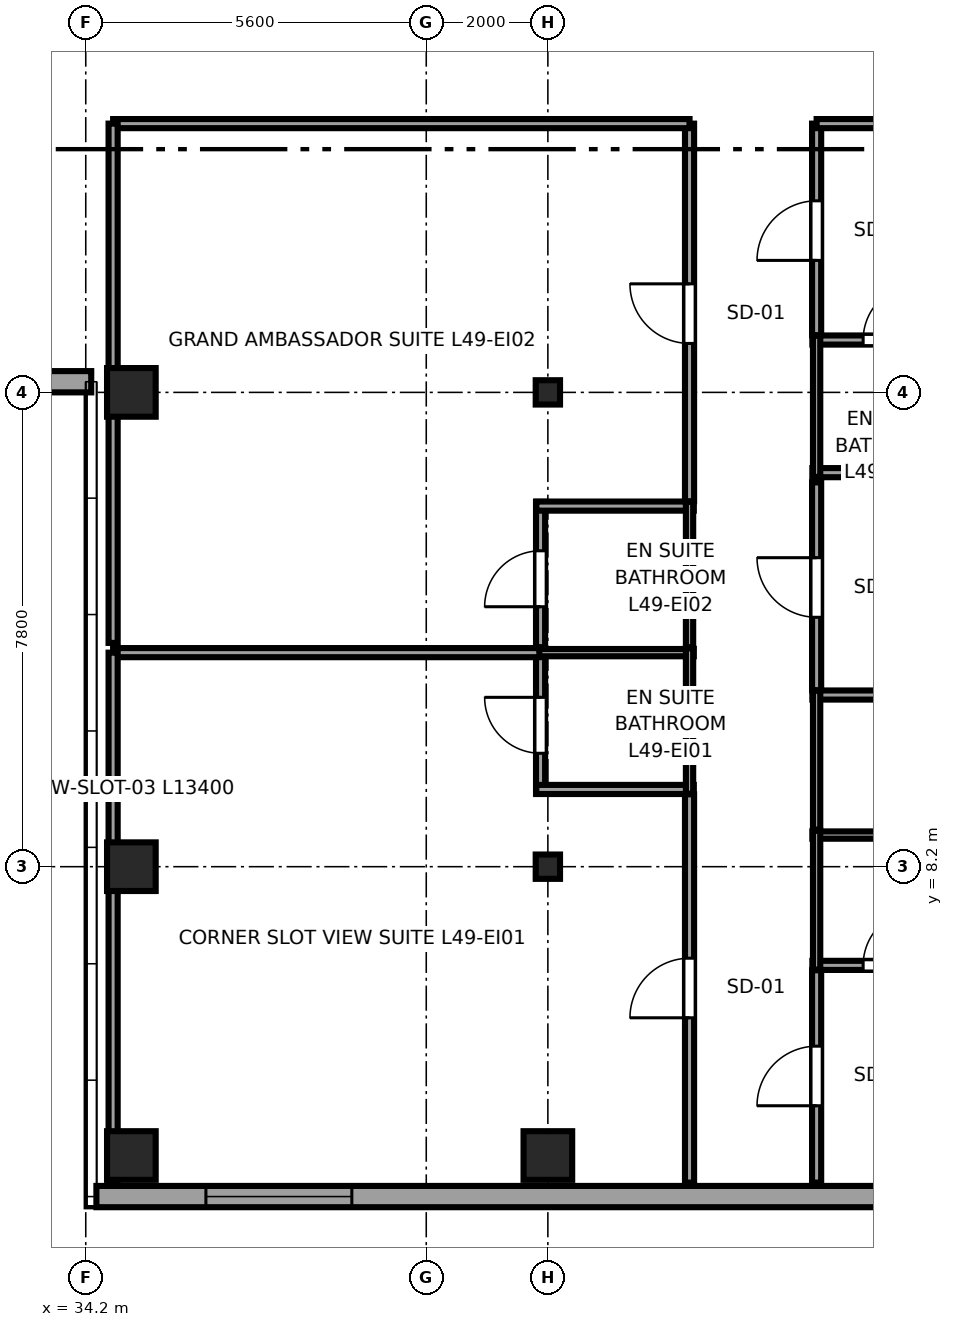
"""IFC4 building model, lengths in metres.
Left out: names, types, materials, properties, quantities, classifications, styles, units other than length and angle.
Written with IfcOpenShell. Run it as: python <this file> out.ifc"""

import sys

from ifc_helpers import new_model, si_unit, direction, frame, frame_2d, origin, origin_2d, place, context, subcontext, project, spatial, rectangle, i_section, extrude, source, transform, mapped, element, fill, save


model = new_model("IFC4")
c1 = context("Model", 3, precision=1e-05, world=origin(), true_north=direction((0.0, 1.0)))
c2 = subcontext(c1, "Body", "Model", "MODEL_VIEW")
j1 = project(units=[si_unit("LENGTHUNIT", "METRE"), si_unit("PLANEANGLEUNIT", "RADIAN")], contexts=[c1])
p1 = place(None, origin())
s1 = spatial("IfcSite", under=j1, at=p1, CompositionType="ELEMENT")
p2 = place(p1, origin())
s2 = spatial("IfcBuilding", under=s1, at=p2, CompositionType="ELEMENT")
p3 = place(p2, frame((0.0, 0.0, 187.55)))
s3 = spatial("IfcBuildingStorey", under=s2, at=p3, CompositionType="ELEMENT", Elevation=187.55)
m1 = source(origin(), c2, "Body", "SweptSolid", [
    extrude(rectangle(XDim=0.8, YDim=0.8, at=origin_2d()), origin(), (0.0, 0.0, 1.0), 3.55),
])
for number, where, z_axis, x_axis in (
    (1, (34.95, 3.45, 0.0), (0.0, 0.0, 1.0), (1.0, 0.0, 0.0)),
    (2, (34.95, 8.2, 0.0), (0.0, 0.0, 1.0), (1.0, 0.0, 0.0)),
    (3, (34.95, 16.0, 0.0), (0.0, 0.0, 1.0), (1.0, 0.0, 0.0)),
    (4, (41.8, 3.45, 0.0), (0.0, 0.0, 1.0), (1.0, 0.0, 0.0)),
):
    element("IfcColumn", number, at=place(p3, frame(where, z_axis=z_axis, x_axis=x_axis)), inside=s3, PredefinedType="COLUMN", context=c2, shape_type="MappedRepresentation", body=[
        mapped(m1, transform((0.0, 0.0, 0.0), x_axis=(1.0, 0.0, 0.0), y_axis=(0.0, 1.0, 0.0), z_axis=(0.0, 0.0, 1.0), scale=1.0)),
    ])
m2 = source(origin(), c2, "Body", "SweptSolid", [
    extrude(i_section(OverallWidth=0.4, OverallDepth=0.4, WebThickness=0.02, FlangeThickness=0.035, at=origin_2d()), origin(), (0.0, 0.0, 1.0), 3.55),
])
for number, where, z_axis, x_axis in (
    (5, (41.8, 8.2, 0.0), (0.0, 0.0, 1.0), (1.0, 0.0, 0.0)),
    (6, (41.8, 16.0, 0.0), (0.0, 0.0, 1.0), (1.0, 0.0, 0.0)),
):
    element("IfcColumn", number, at=place(p3, frame(where, z_axis=z_axis, x_axis=x_axis)), inside=s3, PredefinedType="COLUMN", context=c2, shape_type="MappedRepresentation", body=[
        mapped(m2, transform((0.0, 0.0, 0.0), x_axis=(1.0, 0.0, 0.0), y_axis=(0.0, 1.0, 0.0), z_axis=(0.0, 0.0, 1.0), scale=1.0)),
    ])
p4 = place(p3, frame((22.71, 16.175, 0.0), z_axis=(0.0, 0.0, 1.0), x_axis=(1.0, 0.0, 0.0)))
e7 = element("IfcWall", 7, at=p4, inside=s3, PredefinedType="SOLIDWALL", context=c2, shape_type="SweptSolid", body=[
    extrude(rectangle(XDim=11.58, YDim=0.35, at=frame_2d((5.79, 0.0))), origin(), (0.0, 0.0, 1.0), 2.758),
])
p5 = place(p4, frame((1.995, 0.0, 0.68)))
e8 = element("IfcOpeningElement", 8, at=p5, cuts=e7, PredefinedType="OPENING", context=c2, shape_type="SweptSolid", body=[
    extrude(rectangle(XDim=2.4, YDim=1.9, at=frame_2d((1.2, 0.95))), frame((0.0, 0.185, 0.0), z_axis=(0.0, -1.0, 0.0), x_axis=(1.0, 0.0, 0.0)), (0.0, 0.0, 1.0), 0.37),
])
p6 = place(p4, frame((7.185, 0.0, 0.68)))
e9 = element("IfcOpeningElement", 9, at=p6, cuts=e7, PredefinedType="OPENING", context=c2, shape_type="SweptSolid", body=[
    extrude(rectangle(XDim=2.4, YDim=1.9, at=frame_2d((1.2, 0.95))), frame((0.0, 0.185, 0.0), z_axis=(0.0, -1.0, 0.0), x_axis=(1.0, 0.0, 0.0)), (0.0, 0.0, 1.0), 0.37),
])
p7 = place(p3, frame((34.375, 2.775, 0.0), z_axis=(0.0, 0.0, 1.0), x_axis=(1.0, 0.0, 0.0)))
e10 = element("IfcWall", 10, at=p7, inside=s3, PredefinedType="SOLIDWALL", context=c2, shape_type="SweptSolid", body=[
    extrude(rectangle(XDim=15.608, YDim=0.35, at=frame_2d((7.804, 0.0))), origin(), (0.0, 0.0, 1.0), 3.37),
])
p8 = place(p7, frame((1.801, 0.0, 0.68)))
e11 = element("IfcOpeningElement", 11, at=p8, cuts=e10, PredefinedType="OPENING", context=c2, shape_type="SweptSolid", body=[
    extrude(rectangle(XDim=2.4, YDim=1.9, at=frame_2d((1.2, 0.95))), frame((0.0, 0.185, 0.0), z_axis=(0.0, -1.0, 0.0), x_axis=(1.0, 0.0, 0.0)), (0.0, 0.0, 1.0), 0.37),
])
p9 = place(p7, frame((12.891, 0.0, 0.62)))
e12 = element("IfcOpeningElement", 12, at=p9, cuts=e10, PredefinedType="OPENING", context=c2, shape_type="SweptSolid", body=[
    extrude(rectangle(XDim=1.5, YDim=1.55, at=frame_2d((0.75, 0.775))), frame((0.0, 0.185, 0.0), z_axis=(0.0, -1.0, 0.0), x_axis=(1.0, 0.0, 0.0)), (0.0, 0.0, 1.0), 0.37),
])
p10 = place(p3, frame((41.68, 9.4, 0.0), z_axis=(0.0, 0.0, 1.0), x_axis=(0.0, 1.0, 0.0)))
e13 = element("IfcWall", 13, at=p10, inside=s3, PredefinedType="PARTITIONING", context=c2, shape_type="SweptSolid", body=[
    extrude(rectangle(XDim=2.39, YDim=0.15, at=frame_2d((1.195, 0.0))), origin(), (0.0, 0.0, 1.0), 2.827),
])
p11 = place(p10, frame((0.665, 0.0, 0.0)))
e14 = element("IfcOpeningElement", 14, at=p11, cuts=e13, PredefinedType="OPENING", context=c2, shape_type="SweptSolid", body=[
    extrude(rectangle(XDim=0.92, YDim=2.01, at=frame_2d((0.46, 1.005))), frame((0.0, 0.085, 0.0), z_axis=(0.0, -1.0, 0.0), x_axis=(1.0, 0.0, 0.0)), (0.0, 0.0, 1.0), 0.17),
])
p12 = place(p3, frame((41.61, 9.47, 0.0), z_axis=(0.0, 0.0, 1.0), x_axis=(1.0, 0.0, 0.0)))
e15 = element("IfcWall", 15, at=p12, inside=s3, PredefinedType="PARTITIONING", context=c2, shape_type="SweptSolid", body=[
    extrude(rectangle(XDim=2.59, YDim=0.15, at=frame_2d((1.295, 0.0))), origin(), (0.0, 0.0, 1.0), 3.37),
])
p13 = place(p3, frame((41.61, 11.72, 0.0), z_axis=(0.0, 0.0, 1.0), x_axis=(1.0, 0.0, 0.0)))
e16 = element("IfcWall", 16, at=p13, inside=s3, PredefinedType="PLUMBINGWALL", context=c2, shape_type="SweptSolid", body=[
    extrude(rectangle(XDim=2.59, YDim=0.12, at=frame_2d((1.295, 0.0))), origin(), (0.0, 0.0, 1.0), 3.37),
])
p14 = place(p3, frame((44.13, 9.4, 0.0), z_axis=(0.0, 0.0, 1.0), x_axis=(0.0, 1.0, 0.0)))
e17 = element("IfcWall", 17, at=p14, inside=s3, PredefinedType="PLUMBINGWALL", context=c2, shape_type="SweptSolid", body=[
    extrude(rectangle(XDim=2.39, YDim=0.12, at=frame_2d((1.195, 0.0))), origin(), (0.0, 0.0, 1.0), 3.37),
])
p15 = place(p3, frame((41.68, 11.81, 0.0), z_axis=(0.0, 0.0, 1.0), x_axis=(0.0, 1.0, 0.0)))
e18 = element("IfcWall", 18, at=p15, inside=s3, PredefinedType="PARTITIONING", context=c2, shape_type="SweptSolid", body=[
    extrude(rectangle(XDim=2.39, YDim=0.15, at=frame_2d((1.195, 0.0))), origin(), (0.0, 0.0, 1.0), 2.827),
])
p16 = place(p15, frame((0.665, 0.0, 0.0)))
e19 = element("IfcOpeningElement", 19, at=p16, cuts=e18, PredefinedType="OPENING", context=c2, shape_type="SweptSolid", body=[
    extrude(rectangle(XDim=0.92, YDim=2.01, at=frame_2d((0.46, 1.005))), frame((0.0, 0.085, 0.0), z_axis=(0.0, -1.0, 0.0), x_axis=(1.0, 0.0, 0.0)), (0.0, 0.0, 1.0), 0.17),
])
p17 = place(p3, frame((41.61, 14.13, 0.0), z_axis=(0.0, 0.0, 1.0), x_axis=(1.0, 0.0, 0.0)))
e20 = element("IfcWall", 20, at=p17, inside=s3, PredefinedType="PARTITIONING", context=c2, shape_type="SweptSolid", body=[
    extrude(rectangle(XDim=2.59, YDim=0.15, at=frame_2d((1.295, 0.0))), origin(), (0.0, 0.0, 1.0), 3.37),
])
p18 = place(p3, frame((44.13, 11.81, 0.0), z_axis=(0.0, 0.0, 1.0), x_axis=(0.0, 1.0, 0.0)))
e21 = element("IfcWall", 21, at=p18, inside=s3, PredefinedType="PLUMBINGWALL", context=c2, shape_type="SweptSolid", body=[
    extrude(rectangle(XDim=2.39, YDim=0.12, at=frame_2d((1.195, 0.0))), origin(), (0.0, 0.0, 1.0), 3.37),
])
p19 = place(p3, frame((46.15, 6.577, 0.0), z_axis=(0.0, 0.0, 1.0), x_axis=(1.0, 0.0, 0.0)))
e22 = element("IfcWall", 22, at=p19, inside=s3, PredefinedType="PARTITIONING", context=c2, shape_type="SweptSolid", body=[
    extrude(rectangle(XDim=2.59, YDim=0.15, at=frame_2d((1.295, 0.0))), origin(), (0.0, 0.0, 1.0), 3.37),
])
p20 = place(p19, frame((0.835, 0.0, 0.0)))
e23 = element("IfcOpeningElement", 23, at=p20, cuts=e22, PredefinedType="OPENING", context=c2, shape_type="SweptSolid", body=[
    extrude(rectangle(XDim=0.92, YDim=2.01, at=frame_2d((0.46, 1.005))), frame((0.0, 0.085, 0.0), z_axis=(0.0, -1.0, 0.0), x_axis=(1.0, 0.0, 0.0)), (0.0, 0.0, 1.0), 0.17),
])
p21 = place(p3, frame((46.15, 8.72, 0.0), z_axis=(0.0, 0.0, 1.0), x_axis=(1.0, 0.0, 0.0)))
e24 = element("IfcWall", 24, at=p21, inside=s3, PredefinedType="PLUMBINGWALL", context=c2, shape_type="SweptSolid", body=[
    extrude(rectangle(XDim=2.59, YDim=0.12, at=frame_2d((1.295, 0.0))), origin(), (0.0, 0.0, 1.0), 3.37),
])
p22 = place(p3, frame((46.22, 6.507, 0.0), z_axis=(0.0, 0.0, 1.0), x_axis=(0.0, 1.0, 0.0)))
e25 = element("IfcWall", 25, at=p22, inside=s3, PredefinedType="PLUMBINGWALL", context=c2, shape_type="SweptSolid", body=[
    extrude(rectangle(XDim=2.283, YDim=0.12, at=frame_2d((1.142, 0.0))), origin(), (0.0, 0.0, 1.0), 3.37),
])
p23 = place(p3, frame((46.15, 11.023, 0.0), z_axis=(0.0, 0.0, 1.0), x_axis=(1.0, 0.0, 0.0)))
e26 = element("IfcWall", 26, at=p23, inside=s3, PredefinedType="PARTITIONING", context=c2, shape_type="SweptSolid", body=[
    extrude(rectangle(XDim=2.59, YDim=0.15, at=frame_2d((1.295, 0.0))), origin(), (0.0, 0.0, 1.0), 3.37),
])
p24 = place(p3, frame((46.22, 8.81, 0.0), z_axis=(0.0, 0.0, 1.0), x_axis=(0.0, 1.0, 0.0)))
e27 = element("IfcWall", 27, at=p24, inside=s3, PredefinedType="PLUMBINGWALL", context=c2, shape_type="SweptSolid", body=[
    extrude(rectangle(XDim=2.283, YDim=0.12, at=frame_2d((1.142, 0.0))), origin(), (0.0, 0.0, 1.0), 3.37),
])
p25 = place(p3, frame((46.15, 14.68, 0.0), z_axis=(0.0, 0.0, 1.0), x_axis=(1.0, 0.0, 0.0)))
e28 = element("IfcWall", 28, at=p25, inside=s3, PredefinedType="PARTITIONING", context=c2, shape_type="SweptSolid", body=[
    extrude(rectangle(XDim=7.845, YDim=0.15, at=frame_2d((3.923, 0.0))), origin(), (0.0, 0.0, 1.0), 3.37),
])
p26 = place(p3, frame((46.15, 16.861, 0.0), z_axis=(0.0, 0.0, 1.0), x_axis=(1.0, 0.0, 0.0)))
e29 = element("IfcWall", 29, at=p26, inside=s3, PredefinedType="PARTITIONING", context=c2, shape_type="SweptSolid", body=[
    extrude(rectangle(XDim=2.59, YDim=0.15, at=frame_2d((1.295, 0.0))), origin(), (0.0, 0.0, 1.0), 3.37),
])
p27 = place(p26, frame((0.835, 0.0, 0.0)))
e30 = element("IfcOpeningElement", 30, at=p27, cuts=e29, PredefinedType="OPENING", context=c2, shape_type="SweptSolid", body=[
    extrude(rectangle(XDim=0.92, YDim=2.01, at=frame_2d((0.46, 1.005))), frame((0.0, 0.085, 0.0), z_axis=(0.0, -1.0, 0.0), x_axis=(1.0, 0.0, 0.0)), (0.0, 0.0, 1.0), 0.17),
])
p28 = place(p3, frame((46.22, 14.61, 0.0), z_axis=(0.0, 0.0, 1.0), x_axis=(0.0, 1.0, 0.0)))
e31 = element("IfcWall", 31, at=p28, inside=s3, PredefinedType="PLUMBINGWALL", context=c2, shape_type="SweptSolid", body=[
    extrude(rectangle(XDim=2.321, YDim=0.12, at=frame_2d((1.16, 0.0))), origin(), (0.0, 0.0, 1.0), 3.37),
])
p29 = place(p3, frame((44.13, 3.005, 0.0), z_axis=(0.0, 0.0, 1.0), x_axis=(0.0, 1.0, 0.0)))
e32 = element("IfcWall", 32, at=p29, inside=s3, PredefinedType="PARTITIONING", context=c2, shape_type="SweptSolid", body=[
    extrude(rectangle(XDim=6.385, YDim=0.15, at=frame_2d((3.192, 0.0))), origin(), (0.0, 0.0, 1.0), 3.37),
])
p30 = place(p29, frame((2.71, 0.0, 0.0)))
e33 = element("IfcOpeningElement", 33, at=p30, cuts=e32, PredefinedType="OPENING", context=c2, shape_type="SweptSolid", body=[
    extrude(rectangle(XDim=0.98, YDim=2.12, at=frame_2d((0.49, 1.06))), frame((0.0, 0.085, 0.0), z_axis=(0.0, -1.0, 0.0), x_axis=(1.0, 0.0, 0.0)), (0.0, 0.0, 1.0), 0.17),
])
p31 = place(p3, frame((34.65, 11.72, 0.0), z_axis=(0.0, 0.0, 1.0), x_axis=(1.0, 0.0, 0.0)))
e34 = element("IfcWall", 34, at=p31, inside=s3, PredefinedType="PARTITIONING", context=c2, shape_type="SweptSolid", body=[
    extrude(rectangle(XDim=7.01, YDim=0.15, at=frame_2d((3.505, 0.0))), origin(), (0.0, 0.0, 1.0), 3.37),
])
p32 = place(p3, frame((34.65, 3.005, 0.0), z_axis=(0.0, 0.0, 1.0), x_axis=(0.0, 1.0, 0.0)))
e35 = element("IfcWall", 35, at=p32, inside=s3, PredefinedType="PARTITIONING", context=c2, shape_type="SweptSolid", body=[
    extrude(rectangle(XDim=8.715, YDim=0.15, at=frame_2d((4.357, 0.0))), origin(), (0.0, 0.0, 1.0), 3.37),
])
p33 = place(p3, frame((44.13, 14.21, 0.0), z_axis=(0.0, 0.0, 1.0), x_axis=(0.0, 1.0, 0.0)))
e36 = element("IfcWall", 36, at=p33, inside=s3, PredefinedType="PARTITIONING", context=c2, shape_type="SweptSolid", body=[
    extrude(rectangle(XDim=6.21, YDim=0.15, at=frame_2d((3.105, 0.0))), origin(), (0.0, 0.0, 1.0), 3.37),
])
p34 = place(p33, frame((2.595, 0.0, 0.0)))
e37 = element("IfcOpeningElement", 37, at=p34, cuts=e36, PredefinedType="OPENING", context=c2, shape_type="SweptSolid", body=[
    extrude(rectangle(XDim=0.98, YDim=2.12, at=frame_2d((0.49, 1.06))), frame((0.0, 0.085, 0.0), z_axis=(0.0, -1.0, 0.0), x_axis=(1.0, 0.0, 0.0)), (0.0, 0.0, 1.0), 0.17),
])
p35 = place(p3, frame((34.65, 20.42, 0.0), z_axis=(0.0, 0.0, 1.0), x_axis=(1.0, 0.0, 0.0)))
e38 = element("IfcWall", 38, at=p35, inside=s3, PredefinedType="PARTITIONING", context=c2, shape_type="SweptSolid", body=[
    extrude(rectangle(XDim=9.48, YDim=0.15, at=frame_2d((4.74, 0.0))), origin(), (0.0, 0.0, 1.0), 3.37),
])
p36 = place(p3, frame((34.65, 11.88, 0.0), z_axis=(0.0, 0.0, 1.0), x_axis=(0.0, 1.0, 0.0)))
e39 = element("IfcWall", 39, at=p36, inside=s3, PredefinedType="PARTITIONING", context=c2, shape_type="SweptSolid", body=[
    extrude(rectangle(XDim=8.54, YDim=0.15, at=frame_2d((4.27, 0.0))), origin(), (0.0, 0.0, 1.0), 3.37),
])
p37 = place(p3, frame((46.22, 3.005, 0.0), z_axis=(0.0, 0.0, 1.0), x_axis=(0.0, 1.0, 0.0)))
e40 = element("IfcWall", 40, at=p37, inside=s3, PredefinedType="PARTITIONING", context=c2, shape_type="SweptSolid", body=[
    extrude(rectangle(XDim=3.492, YDim=0.15, at=frame_2d((1.746, 0.0))), origin(), (0.0, 0.0, 1.0), 3.37),
])
p38 = place(p37, frame((1.263, 0.0, 0.0)))
e41 = element("IfcOpeningElement", 41, at=p38, cuts=e40, PredefinedType="OPENING", context=c2, shape_type="SweptSolid", body=[
    extrude(rectangle(XDim=0.98, YDim=2.12, at=frame_2d((0.49, 1.06))), frame((0.0, 0.085, 0.0), z_axis=(0.0, -1.0, 0.0), x_axis=(1.0, 0.0, 0.0)), (0.0, 0.0, 1.0), 0.17),
])
p39 = place(p3, frame((46.22, 11.103, 0.0), z_axis=(0.0, 0.0, 1.0), x_axis=(0.0, 1.0, 0.0)))
e42 = element("IfcWall", 42, at=p39, inside=s3, PredefinedType="PARTITIONING", context=c2, shape_type="SweptSolid", body=[
    extrude(rectangle(XDim=3.417, YDim=0.15, at=frame_2d((1.708, 0.0))), origin(), (0.0, 0.0, 1.0), 3.37),
])
p40 = place(p39, frame((1.198, 0.0, 0.0)))
e43 = element("IfcOpeningElement", 43, at=p40, cuts=e42, PredefinedType="OPENING", context=c2, shape_type="SweptSolid", body=[
    extrude(rectangle(XDim=0.98, YDim=2.12, at=frame_2d((0.49, 1.06))), frame((0.0, 0.085, 0.0), z_axis=(0.0, -1.0, 0.0), x_axis=(1.0, 0.0, 0.0)), (0.0, 0.0, 1.0), 0.17),
])
p41 = place(p3, frame((46.22, 16.941, 0.0), z_axis=(0.0, 0.0, 1.0), x_axis=(0.0, 1.0, 0.0)))
e44 = element("IfcWall", 44, at=p41, inside=s3, PredefinedType="PARTITIONING", context=c2, shape_type="SweptSolid", body=[
    extrude(rectangle(XDim=3.479, YDim=0.15, at=frame_2d((1.74, 0.0))), origin(), (0.0, 0.0, 1.0), 3.37),
])
p42 = place(p41, frame((1.229, 0.0, 0.0)))
e45 = element("IfcOpeningElement", 45, at=p42, cuts=e44, PredefinedType="OPENING", context=c2, shape_type="SweptSolid", body=[
    extrude(rectangle(XDim=0.98, YDim=2.12, at=frame_2d((0.49, 1.06))), frame((0.0, 0.085, 0.0), z_axis=(0.0, -1.0, 0.0), x_axis=(1.0, 0.0, 0.0)), (0.0, 0.0, 1.0), 0.17),
])
p43 = place(p3, frame((46.22, 20.42, 0.0), z_axis=(0.0, 0.0, 1.0), x_axis=(1.0, 0.0, 0.0)))
e46 = element("IfcWall", 46, at=p43, inside=s3, PredefinedType="PARTITIONING", context=c2, shape_type="SweptSolid", body=[
    extrude(rectangle(XDim=7.775, YDim=0.15, at=frame_2d((3.888, 0.0))), origin(), (0.0, 0.0, 1.0), 3.37),
])
m3 = source(origin(), c2, "Body", "SweptSolid", [
    extrude(rectangle(XDim=2.4, YDim=1.9, at=frame_2d((1.2, 0.95))), frame((0.0, 0.09, 0.0), z_axis=(0.0, -1.0, 0.0), x_axis=(1.0, 0.0, 0.0)), (0.0, 0.0, 1.0), 0.06),
])
p44 = place(p8, origin())
e47 = element("IfcWindow", 47, at=p44, inside=s3, PartitioningType="TRIPLE_PANEL_HORIZONTAL", PredefinedType="WINDOW", context=c2, shape_type="MappedRepresentation", body=[
    mapped(m3, transform((0.0, 0.0, 0.0), x_axis=(1.0, 0.0, 0.0), y_axis=(0.0, 1.0, 0.0), z_axis=(0.0, 0.0, 1.0), scale=1.0)),
])
fill(e11, e47)
m4 = source(origin(), c2, "Body", "SweptSolid", [
    extrude(rectangle(XDim=0.92, YDim=2.01, at=frame_2d((0.46, 1.005))), frame((0.0, 0.025, 0.0), z_axis=(0.0, -1.0, 0.0), x_axis=(1.0, 0.0, 0.0)), (0.0, 0.0, 1.0), 0.05),
])
p45 = place(p11, origin())
e48 = element("IfcDoor", 48, at=p45, inside=s3, OperationType="SINGLE_SWING_RIGHT", PredefinedType="DOOR", context=c2, shape_type="MappedRepresentation", body=[
    mapped(m4, transform((0.0, 0.0, 0.0), x_axis=(1.0, 0.0, 0.0), y_axis=(0.0, 1.0, 0.0), z_axis=(0.0, 0.0, 1.0), scale=1.0)),
])
fill(e14, e48)
p46 = place(p16, origin())
e49 = element("IfcDoor", 49, at=p46, inside=s3, OperationType="SINGLE_SWING_LEFT", PredefinedType="DOOR", context=c2, shape_type="MappedRepresentation", body=[
    mapped(m4, transform((0.0, 0.0, 0.0), x_axis=(1.0, 0.0, 0.0), y_axis=(0.0, 1.0, 0.0), z_axis=(0.0, 0.0, 1.0), scale=1.0)),
])
fill(e19, e49)
p47 = place(p20, origin())
e50 = element("IfcDoor", 50, at=p47, inside=s3, OperationType="SINGLE_SWING_RIGHT", PredefinedType="DOOR", context=c2, shape_type="MappedRepresentation", body=[
    mapped(m4, transform((0.0, 0.0, 0.0), x_axis=(1.0, 0.0, 0.0), y_axis=(0.0, 1.0, 0.0), z_axis=(0.0, 0.0, 1.0), scale=1.0)),
])
fill(e23, e50)
p48 = place(p27, origin())
e51 = element("IfcDoor", 51, at=p48, inside=s3, OperationType="SINGLE_SWING_RIGHT", PredefinedType="DOOR", context=c2, shape_type="MappedRepresentation", body=[
    mapped(m4, transform((0.0, 0.0, 0.0), x_axis=(1.0, 0.0, 0.0), y_axis=(0.0, 1.0, 0.0), z_axis=(0.0, 0.0, 1.0), scale=1.0)),
])
fill(e30, e51)
m5 = source(origin(), c2, "Body", "SweptSolid", [
    extrude(rectangle(XDim=0.98, YDim=2.12, at=frame_2d((0.49, 1.06))), frame((0.0, 0.025, 0.0), z_axis=(0.0, -1.0, 0.0), x_axis=(1.0, 0.0, 0.0)), (0.0, 0.0, 1.0), 0.05),
])
p49 = place(p30, origin())
e52 = element("IfcDoor", 52, at=p49, inside=s3, OperationType="SINGLE_SWING_LEFT", PredefinedType="DOOR", context=c2, shape_type="MappedRepresentation", body=[
    mapped(m5, transform((0.0, 0.0, 0.0), x_axis=(1.0, 0.0, 0.0), y_axis=(0.0, 1.0, 0.0), z_axis=(0.0, 0.0, 1.0), scale=1.0)),
])
fill(e33, e52)
p50 = place(p34, origin())
e53 = element("IfcDoor", 53, at=p50, inside=s3, OperationType="SINGLE_SWING_RIGHT", PredefinedType="DOOR", context=c2, shape_type="MappedRepresentation", body=[
    mapped(m5, transform((0.0, 0.0, 0.0), x_axis=(1.0, 0.0, 0.0), y_axis=(0.0, 1.0, 0.0), z_axis=(0.0, 0.0, 1.0), scale=1.0)),
])
fill(e37, e53)
p51 = place(p38, origin())
e54 = element("IfcDoor", 54, at=p51, inside=s3, OperationType="SINGLE_SWING_LEFT", PredefinedType="DOOR", context=c2, shape_type="MappedRepresentation", body=[
    mapped(m5, transform((0.0, 0.0, 0.0), x_axis=(1.0, 0.0, 0.0), y_axis=(0.0, 1.0, 0.0), z_axis=(0.0, 0.0, 1.0), scale=1.0)),
])
fill(e41, e54)
p52 = place(p40, origin())
e55 = element("IfcDoor", 55, at=p52, inside=s3, OperationType="SINGLE_SWING_RIGHT", PredefinedType="DOOR", context=c2, shape_type="MappedRepresentation", body=[
    mapped(m5, transform((0.0, 0.0, 0.0), x_axis=(1.0, 0.0, 0.0), y_axis=(0.0, 1.0, 0.0), z_axis=(0.0, 0.0, 1.0), scale=1.0)),
])
fill(e43, e55)
p53 = place(p42, origin())
e56 = element("IfcDoor", 56, at=p53, inside=s3, OperationType="SINGLE_SWING_LEFT", PredefinedType="DOOR", context=c2, shape_type="MappedRepresentation", body=[
    mapped(m5, transform((0.0, 0.0, 0.0), x_axis=(1.0, 0.0, 0.0), y_axis=(0.0, 1.0, 0.0), z_axis=(0.0, 0.0, 1.0), scale=1.0)),
])
fill(e45, e56)
save(model, sys.argv[1])
